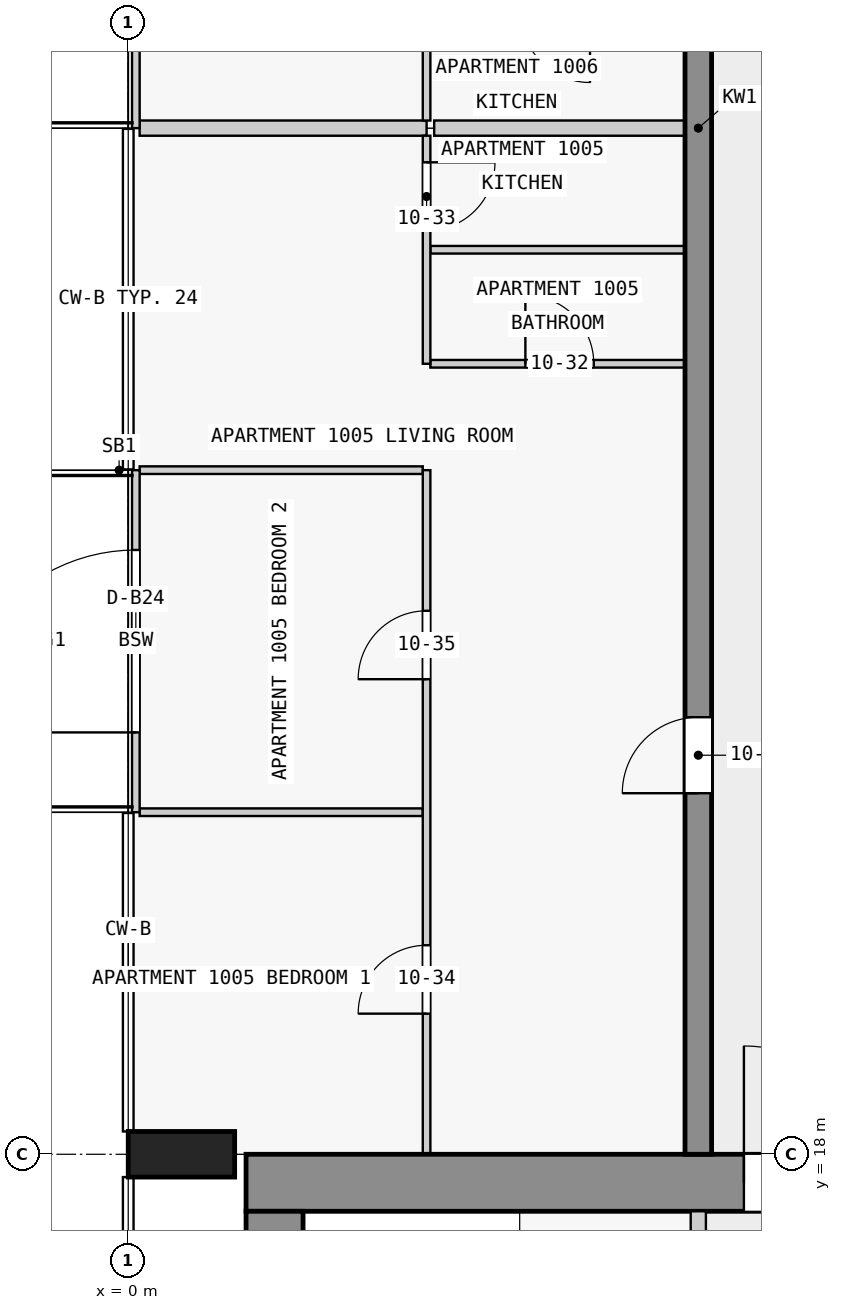
"""IFC4 building model, lengths in metres.
Left out: names, types, materials, properties, quantities, classifications, styles, units other than length and angle.
Written with IfcOpenShell. Run it as: python <this file> out.ifc"""

import sys

from ifc_helpers import new_model, si_unit, direction, frame, frame_2d, origin, origin_2d, place, context, subcontext, project, spatial, rectangle, extrude, element, fill, save


model = new_model("IFC4")
c1 = context("Model", 3, precision=1e-05, world=origin(), true_north=direction((0.0, 1.0)))
c2 = subcontext(c1, "Body", "Model", "MODEL_VIEW")
j1 = project(units=[si_unit("LENGTHUNIT", "METRE"), si_unit("PLANEANGLEUNIT", "RADIAN")], contexts=[c1])
p1 = place(None, origin())
s1 = spatial("IfcSite", under=j1, at=p1, CompositionType="ELEMENT")
p2 = place(p1, origin())
s2 = spatial("IfcBuilding", under=s1, at=p2, CompositionType="ELEMENT")
p3 = place(p2, frame((0.0, 0.0, 44.3)))
s3 = spatial("IfcBuildingStorey", under=s2, at=p3, CompositionType="ELEMENT", Elevation=44.3)
p4 = place(p3, frame((0.7, 18.0, 0.0), z_axis=(0.0, 0.0, 1.0), x_axis=(0.0, 1.0, 0.0)))
e1 = element("IfcColumn", 1, at=p4, inside=s3, PredefinedType="COLUMN", context=c2, shape_type="SweptSolid", body=[
    extrude(rectangle(XDim=0.6, YDim=1.4, at=origin_2d()), origin(), (0.0, 0.0, 1.0), 3.5),
])
p5 = place(p3, frame((1.55, 17.625, 0.0), z_axis=(0.0, 0.0, 1.0), x_axis=(1.0, 0.0, 0.0)))
e2 = element("IfcWall", 2, at=p5, inside=s3, PredefinedType="SHEAR", context=c2, shape_type="SweptSolid", body=[
    extrude(rectangle(XDim=20.95, YDim=0.75, at=frame_2d((10.475, 0.0))), origin(), (0.0, 0.0, 1.0), 3.25),
])
p6 = place(p5, frame((6.55, 0.0, 0.0)))
e3 = element("IfcOpeningElement", 3, at=p6, cuts=e2, PredefinedType="OPENING", context=c2, shape_type="SweptSolid", body=[
    extrude(rectangle(XDim=1.8, YDim=2.1, at=frame_2d((0.9, 1.05))), frame((0.0, 0.385, 0.0), z_axis=(0.0, -1.0, 0.0), x_axis=(1.0, 0.0, 0.0)), (0.0, 0.0, 1.0), 0.77),
])
p7 = place(p3, frame((1.925, 2.5, 0.0), z_axis=(0.0, 0.0, 1.0), x_axis=(0.0, 1.0, 0.0)))
e4 = element("IfcWall", 4, at=p7, inside=s3, PredefinedType="SHEAR", context=c2, shape_type="SweptSolid", body=[
    extrude(rectangle(XDim=14.75, YDim=0.75, at=frame_2d((7.375, 0.0))), origin(), (0.0, 0.0, 1.0), 3.25),
])
p8 = place(p3, frame((7.5, 18.0, 0.0), z_axis=(0.0, 0.0, 1.0), x_axis=(0.0, 1.0, 0.0)))
e5 = element("IfcWall", 5, at=p8, inside=s3, PredefinedType="SHEAR", context=c2, shape_type="SweptSolid", body=[
    extrude(rectangle(XDim=27.0, YDim=0.35, at=frame_2d((13.5, 0.0))), origin(), (0.0, 0.0, 1.0), 3.25),
])
p9 = place(p8, frame((4.75, 0.0, 0.0)))
e6 = element("IfcOpeningElement", 6, at=p9, cuts=e5, PredefinedType="OPENING", context=c2, shape_type="SweptSolid", body=[
    extrude(rectangle(XDim=1.0, YDim=2.1, at=frame_2d((0.5, 1.05))), frame((0.0, 0.185, 0.0), z_axis=(0.0, -1.0, 0.0), x_axis=(1.0, 0.0, 0.0)), (0.0, 0.0, 1.0), 0.37),
])
p10 = place(p8, frame((15.25, 0.0, 0.0)))
e7 = element("IfcOpeningElement", 7, at=p10, cuts=e5, PredefinedType="OPENING", context=c2, shape_type="SweptSolid", body=[
    extrude(rectangle(XDim=1.0, YDim=2.1, at=frame_2d((0.5, 1.05))), frame((0.0, 0.185, 0.0), z_axis=(0.0, -1.0, 0.0), x_axis=(1.0, 0.0, 0.0)), (0.0, 0.0, 1.0), 0.37),
])
p11 = place(p8, frame((19.75, 0.0, 0.0)))
e8 = element("IfcOpeningElement", 8, at=p11, cuts=e5, PredefinedType="OPENING", context=c2, shape_type="SweptSolid", body=[
    extrude(rectangle(XDim=1.0, YDim=2.1, at=frame_2d((0.5, 1.05))), frame((0.0, 0.185, 0.0), z_axis=(0.0, -1.0, 0.0), x_axis=(1.0, 0.0, 0.0)), (0.0, 0.0, 1.0), 0.37),
])
p12 = place(p8, frame((23.25, 0.0, 0.0)))
e9 = element("IfcOpeningElement", 9, at=p12, cuts=e5, PredefinedType="OPENING", context=c2, shape_type="SweptSolid", body=[
    extrude(rectangle(XDim=0.9, YDim=2.1, at=frame_2d((0.45, 1.05))), frame((0.0, 0.185, 0.0), z_axis=(0.0, -1.0, 0.0), x_axis=(1.0, 0.0, 0.0)), (0.0, 0.0, 1.0), 0.37),
])
p13 = place(p8, frame((25.45, 0.0, 0.0)))
e10 = element("IfcOpeningElement", 10, at=p13, cuts=e5, PredefinedType="OPENING", context=c2, shape_type="SweptSolid", body=[
    extrude(rectangle(XDim=1.0, YDim=2.1, at=frame_2d((0.5, 1.05))), frame((0.0, 0.185, 0.0), z_axis=(0.0, -1.0, 0.0), x_axis=(1.0, 0.0, 0.0)), (0.0, 0.0, 1.0), 0.37),
])
p14 = place(p3, frame((0.1, 22.5, 0.0), z_axis=(0.0, 0.0, 1.0), x_axis=(0.0, 1.0, 0.0)))
e11 = element("IfcWall", 11, at=p14, inside=s3, PredefinedType="STANDARD", context=c2, shape_type="SweptSolid", body=[
    extrude(rectangle(XDim=4.5, YDim=0.1, at=frame_2d((2.25, 0.0))), origin(), (0.0, 0.0, 1.0), 3.25),
])
p15 = place(p14, frame((1.05, 0.0, 0.0)))
e12 = element("IfcOpeningElement", 12, at=p15, cuts=e11, PredefinedType="OPENING", context=c2, shape_type="SweptSolid", body=[
    extrude(rectangle(XDim=2.4, YDim=2.4, at=frame_2d((1.2, 1.2))), frame((0.0, 0.06, 0.0), z_axis=(0.0, -1.0, 0.0), x_axis=(1.0, 0.0, 0.0)), (0.0, 0.0, 1.0), 0.12),
])
p16 = place(p3, frame((0.1, 31.5, 0.0), z_axis=(0.0, 0.0, 1.0), x_axis=(0.0, 1.0, 0.0)))
e13 = element("IfcWall", 13, at=p16, inside=s3, PredefinedType="STANDARD", context=c2, shape_type="SweptSolid", body=[
    extrude(rectangle(XDim=4.5, YDim=0.1, at=frame_2d((2.25, 0.0))), origin(), (0.0, 0.0, 1.0), 3.25),
])
p17 = place(p16, frame((1.05, 0.0, 0.0)))
e14 = element("IfcOpeningElement", 14, at=p17, cuts=e13, PredefinedType="OPENING", context=c2, shape_type="SweptSolid", body=[
    extrude(rectangle(XDim=2.4, YDim=2.4, at=frame_2d((1.2, 1.2))), frame((0.0, 0.06, 0.0), z_axis=(0.0, -1.0, 0.0), x_axis=(1.0, 0.0, 0.0)), (0.0, 0.0, 1.0), 0.12),
])
p18 = place(p3, frame((7.5, 10.1, 0.0), z_axis=(0.0, 0.0, 1.0), x_axis=(0.0, 1.0, 0.0)))
e15 = element("IfcWall", 15, at=p18, inside=s3, PredefinedType="PARTITIONING", context=c2, shape_type="SweptSolid", body=[
    extrude(rectangle(XDim=7.15, YDim=0.2, at=frame_2d((3.575, 0.0))), origin(), (0.0, 0.0, 1.0), 3.25),
])
p19 = place(p18, frame((0.775, 0.0, 0.0)))
e16 = element("IfcOpeningElement", 16, at=p19, cuts=e15, PredefinedType="OPENING", context=c2, shape_type="SweptSolid", body=[
    extrude(rectangle(XDim=0.9, YDim=2.1, at=frame_2d((0.45, 1.05))), frame((0.0, 0.11, 0.0), z_axis=(0.0, -1.0, 0.0), x_axis=(1.0, 0.0, 0.0)), (0.0, 0.0, 1.0), 0.22),
])
p20 = place(p18, frame((3.225, 0.0, 0.0)))
e17 = element("IfcOpeningElement", 17, at=p20, cuts=e15, PredefinedType="OPENING", context=c2, shape_type="SweptSolid", body=[
    extrude(rectangle(XDim=0.9, YDim=2.1, at=frame_2d((0.45, 1.05))), frame((0.0, 0.11, 0.0), z_axis=(0.0, -1.0, 0.0), x_axis=(1.0, 0.0, 0.0)), (0.0, 0.0, 1.0), 0.22),
])
p21 = place(p18, frame((5.25, 0.0, 0.0)))
e18 = element("IfcOpeningElement", 18, at=p21, cuts=e15, PredefinedType="OPENING", context=c2, shape_type="SweptSolid", body=[
    extrude(rectangle(XDim=0.9, YDim=2.1, at=frame_2d((0.45, 1.05))), frame((0.0, 0.11, 0.0), z_axis=(0.0, -1.0, 0.0), x_axis=(1.0, 0.0, 0.0)), (0.0, 0.0, 1.0), 0.22),
])
for number, where, z_axis, x_axis in (
    (19, (3.875, 22.5, 0.0), (0.0, 0.0, 1.0), (-1.0, 0.0, 0.0)),
    (20, (3.875, 27.0, 0.0), (0.0, 0.0, 1.0), (-1.0, 0.0, 0.0)),
):
    element("IfcWall", number, at=place(p3, frame(where, z_axis=z_axis, x_axis=x_axis)), inside=s3, PredefinedType="PARTITIONING", context=c2, shape_type="SweptSolid", body=[
        extrude(rectangle(XDim=3.725, YDim=0.1, at=frame_2d((1.863, 0.0))), origin(), (0.0, 0.0, 1.0), 3.25),
    ])
p22 = place(p3, frame((3.975, 28.4, 0.0), z_axis=(0.0, 0.0, 1.0), x_axis=(1.0, 0.0, 0.0)))
e21 = element("IfcWall", 21, at=p22, inside=s3, PredefinedType="PARTITIONING", context=c2, shape_type="SweptSolid", body=[
    extrude(rectangle(XDim=3.35, YDim=0.1, at=frame_2d((1.675, 0.0))), origin(), (0.0, 0.0, 1.0), 3.25),
])
p23 = place(p22, frame((1.25, 0.0, 0.0)))
e22 = element("IfcOpeningElement", 22, at=p23, cuts=e21, PredefinedType="OPENING", context=c2, shape_type="SweptSolid", body=[
    extrude(rectangle(XDim=0.9, YDim=2.1, at=frame_2d((0.45, 1.05))), frame((0.0, 0.06, 0.0), z_axis=(0.0, -1.0, 0.0), x_axis=(1.0, 0.0, 0.0)), (0.0, 0.0, 1.0), 0.12),
])
p24 = place(p3, frame((7.325, 29.9, 0.0), z_axis=(0.0, 0.0, 1.0), x_axis=(-1.0, 0.0, 0.0)))
e23 = element("IfcWall", 23, at=p24, inside=s3, PredefinedType="PARTITIONING", context=c2, shape_type="SweptSolid", body=[
    extrude(rectangle(XDim=3.35, YDim=0.1, at=frame_2d((1.675, 0.0))), origin(), (0.0, 0.0, 1.0), 3.25),
])
p25 = place(p3, frame((7.325, 31.5, 0.0), z_axis=(0.0, 0.0, 1.0), x_axis=(-1.0, 0.0, 0.0)))
e24 = element("IfcWall", 24, at=p25, inside=s3, PredefinedType="PARTITIONING", context=c2, shape_type="SweptSolid", body=[
    extrude(rectangle(XDim=3.3, YDim=0.2, at=frame_2d((1.65, 0.0))), origin(), (0.0, 0.0, 1.0), 3.25),
])
p26 = place(p3, frame((0.15, 31.5, 0.0), z_axis=(0.0, 0.0, 1.0), x_axis=(1.0, 0.0, 0.0)))
e25 = element("IfcWall", 25, at=p26, inside=s3, PredefinedType="PARTITIONING", context=c2, shape_type="SweptSolid", body=[
    extrude(rectangle(XDim=3.775, YDim=0.2, at=frame_2d((1.888, 0.0))), origin(), (0.0, 0.0, 1.0), 3.25),
])
p27 = place(p3, frame((3.925, 31.4, 0.0), z_axis=(0.0, 0.0, 1.0), x_axis=(0.0, -1.0, 0.0)))
e26 = element("IfcWall", 26, at=p27, inside=s3, PredefinedType="PARTITIONING", context=c2, shape_type="SweptSolid", body=[
    extrude(rectangle(XDim=3.0, YDim=0.1, at=frame_2d((1.5, 0.0))), origin(), (0.0, 0.0, 1.0), 3.25),
])
p28 = place(p27, frame((0.35, 0.0, 0.0)))
e27 = element("IfcOpeningElement", 27, at=p28, cuts=e26, PredefinedType="OPENING", context=c2, shape_type="SweptSolid", body=[
    extrude(rectangle(XDim=0.9, YDim=2.1, at=frame_2d((0.45, 1.05))), frame((0.0, 0.06, 0.0), z_axis=(0.0, -1.0, 0.0), x_axis=(1.0, 0.0, 0.0)), (0.0, 0.0, 1.0), 0.12),
])
p29 = place(p3, frame((3.925, 33.0, 0.0), z_axis=(0.0, 0.0, 1.0), x_axis=(0.0, -1.0, 0.0)))
e28 = element("IfcWall", 28, at=p29, inside=s3, PredefinedType="PARTITIONING", context=c2, shape_type="SweptSolid", body=[
    extrude(rectangle(XDim=1.4, YDim=0.1, at=frame_2d((0.7, 0.0))), origin(), (0.0, 0.0, 1.0), 3.25),
])
p30 = place(p3, frame((3.925, 18.0, 0.0), z_axis=(0.0, 0.0, 1.0), x_axis=(0.0, 1.0, 0.0)))
e29 = element("IfcWall", 29, at=p30, inside=s3, PredefinedType="PARTITIONING", context=c2, shape_type="SweptSolid", body=[
    extrude(rectangle(XDim=9.0, YDim=0.1, at=frame_2d((4.5, 0.0))), origin(), (0.0, 0.0, 1.0), 3.25),
])
p31 = place(p30, frame((1.85, 0.0, 0.0)))
e30 = element("IfcOpeningElement", 30, at=p31, cuts=e29, PredefinedType="OPENING", context=c2, shape_type="SweptSolid", body=[
    extrude(rectangle(XDim=0.9, YDim=2.1, at=frame_2d((0.45, 1.05))), frame((0.0, 0.06, 0.0), z_axis=(0.0, -1.0, 0.0), x_axis=(1.0, 0.0, 0.0)), (0.0, 0.0, 1.0), 0.12),
])
p32 = place(p30, frame((6.25, 0.0, 0.0)))
e31 = element("IfcOpeningElement", 31, at=p32, cuts=e29, PredefinedType="OPENING", context=c2, shape_type="SweptSolid", body=[
    extrude(rectangle(XDim=0.9, YDim=2.1, at=frame_2d((0.45, 1.05))), frame((0.0, 0.06, 0.0), z_axis=(0.0, -1.0, 0.0), x_axis=(1.0, 0.0, 0.0)), (0.0, 0.0, 1.0), 0.12),
])
p33 = place(p15, origin())
e32 = element("IfcDoor", 32, at=p33, inside=s3, OperationType="SINGLE_SWING_LEFT", PredefinedType="DOOR", context=c2, shape_type="SweptSolid", body=[
    extrude(rectangle(XDim=2.4, YDim=2.4, at=frame_2d((1.2, 1.2))), frame((0.0, 0.025, 0.0), z_axis=(0.0, -1.0, 0.0), x_axis=(1.0, 0.0, 0.0)), (0.0, 0.0, 1.0), 0.05),
])
fill(e12, e32)
p34 = place(p6, origin())
e33 = element("IfcDoor", 33, at=p34, inside=s3, OperationType="DOUBLE_DOOR_SINGLE_SWING", PredefinedType="DOOR", context=c2, shape_type="SweptSolid", body=[
    extrude(rectangle(XDim=1.8, YDim=2.1, at=frame_2d((0.9, 1.05))), frame((0.0, 0.025, 0.0), z_axis=(0.0, -1.0, 0.0), x_axis=(1.0, 0.0, 0.0)), (0.0, 0.0, 1.0), 0.05),
])
fill(e3, e33)
p35 = place(p9, origin())
e34 = element("IfcDoor", 34, at=p35, inside=s3, OperationType="SINGLE_SWING_LEFT", PredefinedType="DOOR", context=c2, shape_type="SweptSolid", body=[
    extrude(rectangle(XDim=1.0, YDim=2.1, at=frame_2d((0.5, 1.05))), frame((0.0, 0.025, 0.0), z_axis=(0.0, -1.0, 0.0), x_axis=(1.0, 0.0, 0.0)), (0.0, 0.0, 1.0), 0.05),
])
fill(e6, e34)
p36 = place(p23, origin())
e35 = element("IfcDoor", 35, at=p36, inside=s3, OperationType="SINGLE_SWING_RIGHT", PredefinedType="DOOR", context=c2, shape_type="SweptSolid", body=[
    extrude(rectangle(XDim=0.9, YDim=2.1, at=frame_2d((0.45, 1.05))), frame((0.0, 0.025, 0.0), z_axis=(0.0, -1.0, 0.0), x_axis=(1.0, 0.0, 0.0)), (0.0, 0.0, 1.0), 0.05),
])
fill(e22, e35)
p37 = place(p28, origin())
e36 = element("IfcDoor", 36, at=p37, inside=s3, OperationType="SINGLE_SWING_LEFT", PredefinedType="DOOR", context=c2, shape_type="SweptSolid", body=[
    extrude(rectangle(XDim=0.9, YDim=2.1, at=frame_2d((0.45, 1.05))), frame((0.0, 0.025, 0.0), z_axis=(0.0, -1.0, 0.0), x_axis=(1.0, 0.0, 0.0)), (0.0, 0.0, 1.0), 0.05),
])
fill(e27, e36)
p38 = place(p31, origin())
e37 = element("IfcDoor", 37, at=p38, inside=s3, OperationType="SINGLE_SWING_LEFT", PredefinedType="DOOR", context=c2, shape_type="SweptSolid", body=[
    extrude(rectangle(XDim=0.9, YDim=2.1, at=frame_2d((0.45, 1.05))), frame((0.0, 0.025, 0.0), z_axis=(0.0, -1.0, 0.0), x_axis=(1.0, 0.0, 0.0)), (0.0, 0.0, 1.0), 0.05),
])
fill(e30, e37)
p39 = place(p32, origin())
e38 = element("IfcDoor", 38, at=p39, inside=s3, OperationType="SINGLE_SWING_RIGHT", PredefinedType="DOOR", context=c2, shape_type="SweptSolid", body=[
    extrude(rectangle(XDim=0.9, YDim=2.1, at=frame_2d((0.45, 1.05))), frame((0.0, 0.025, 0.0), z_axis=(0.0, -1.0, 0.0), x_axis=(1.0, 0.0, 0.0)), (0.0, 0.0, 1.0), 0.05),
])
fill(e31, e38)
save(model, sys.argv[1])
